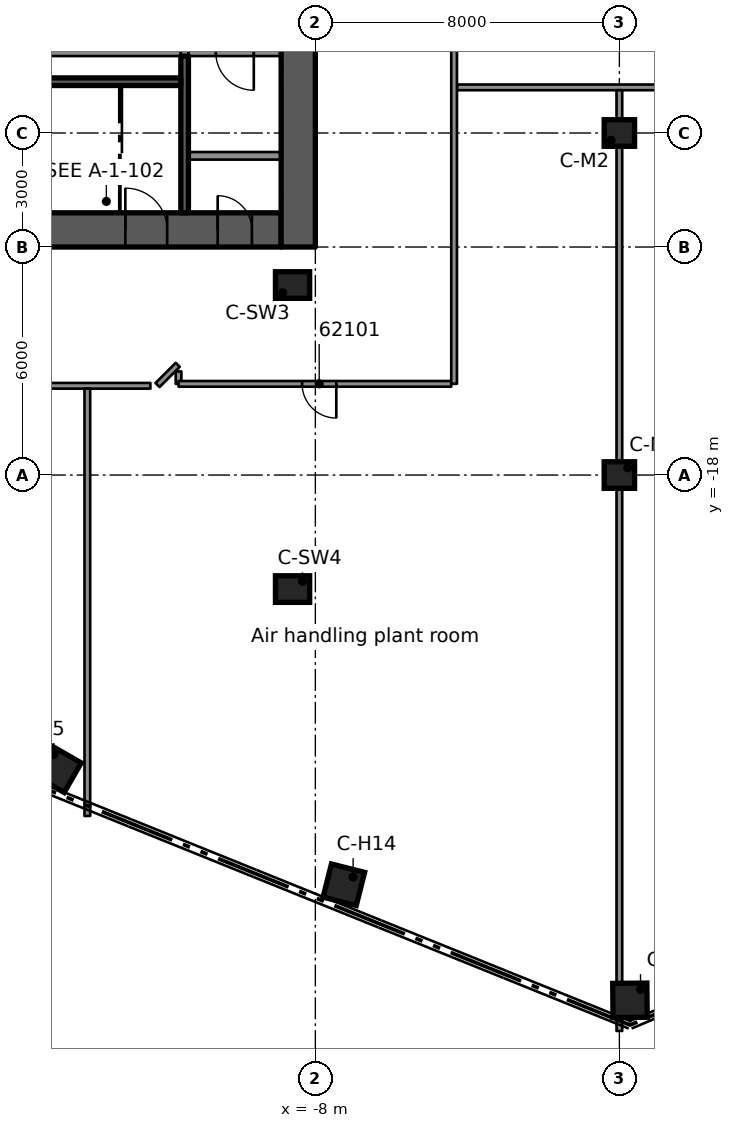
"""IFC4 building model, lengths in metres.
Left out: names, types, materials, properties, quantities, classifications, styles, units other than length and angle.
Written with IfcOpenShell. Run it as: python <this file> out.ifc"""

import sys

from ifc_helpers import new_model, si_unit, direction, frame, frame_2d, origin, origin_2d, place, context, subcontext, project, spatial, rectangle, extrude, element, fill, save


model = new_model("IFC4")
c1 = context("Model", 3, precision=1e-05, world=origin(), true_north=direction((0.0, 1.0)))
c2 = subcontext(c1, "Body", "Model", "MODEL_VIEW")
j1 = project(units=[si_unit("LENGTHUNIT", "METRE"), si_unit("PLANEANGLEUNIT", "RADIAN")], contexts=[c1])
p1 = place(None, origin())
s1 = spatial("IfcSite", under=j1, at=p1, CompositionType="ELEMENT")
p2 = place(p1, origin())
s2 = spatial("IfcBuilding", under=s1, at=p2, CompositionType="ELEMENT")
p3 = place(p2, frame((0.0, 0.0, 299.9)))
s3 = spatial("IfcBuildingStorey", under=s2, at=p3, CompositionType="ELEMENT", Elevation=299.9)
p4 = place(p3, frame((-18.1, -11.55, 0.0), z_axis=(0.0, 0.0, 1.0), x_axis=(1.0, 0.0, 0.0)))
e1 = element("IfcWall", 1, at=p4, inside=s3, PredefinedType="SHEAR", context=c2, shape_type="SweptSolid", body=[
    extrude(rectangle(XDim=9.2, YDim=0.9, at=frame_2d((4.6, 0.0))), origin(), (0.0, 0.0, 1.0), 4.4),
])
p5 = place(p4, frame((5.1, 0.0, 0.0)))
e2 = element("IfcOpeningElement", 2, at=p5, cuts=e1, PredefinedType="OPENING", context=c2, shape_type="SweptSolid", body=[
    extrude(rectangle(XDim=1.1, YDim=2.1, at=frame_2d((0.55, 1.05))), frame((0.0, 0.46, 0.0), z_axis=(0.0, -1.0, 0.0), x_axis=(1.0, 0.0, 0.0)), (0.0, 0.0, 1.0), 0.92),
])
p6 = place(p4, frame((7.53, 0.0, 0.0)))
e3 = element("IfcOpeningElement", 3, at=p6, cuts=e1, PredefinedType="OPENING", context=c2, shape_type="SweptSolid", body=[
    extrude(rectangle(XDim=0.9, YDim=2.1, at=frame_2d((0.45, 1.05))), frame((0.0, 0.46, 0.0), z_axis=(0.0, -1.0, 0.0), x_axis=(1.0, 0.0, 0.0)), (0.0, 0.0, 1.0), 0.92),
])
p7 = place(p3, frame((-8.45, -12.0, 0.0), z_axis=(0.0, 0.0, 1.0), x_axis=(0.0, 1.0, 0.0)))
e4 = element("IfcWall", 4, at=p7, inside=s3, PredefinedType="SHEAR", context=c2, shape_type="SweptSolid", body=[
    extrude(rectangle(XDim=24.0, YDim=0.9, at=frame_2d((12.0, 0.0))), origin(), (0.0, 0.0, 1.0), 4.4),
])
p8 = place(p7, frame((9.6, 0.0, 0.0)))
e5 = element("IfcOpeningElement", 5, at=p8, cuts=e4, PredefinedType="OPENING", context=c2, shape_type="SweptSolid", body=[
    extrude(rectangle(XDim=1.8, YDim=2.1, at=frame_2d((0.9, 1.05))), frame((0.0, 0.46, 0.0), z_axis=(0.0, -1.0, 0.0), x_axis=(1.0, 0.0, 0.0)), (0.0, 0.0, 1.0), 0.92),
])
p9 = place(p7, frame((5.9, 0.0, 0.0)))
e6 = element("IfcOpeningElement", 6, at=p9, cuts=e4, PredefinedType="OPENING", context=c2, shape_type="SweptSolid", body=[
    extrude(rectangle(XDim=1.8, YDim=2.1, at=frame_2d((0.9, 1.05))), frame((0.0, 0.46, 0.0), z_axis=(0.0, -1.0, 0.0), x_axis=(1.0, 0.0, 0.0)), (0.0, 0.0, 1.0), 0.92),
])
p10 = place(p7, frame((12.6, 0.0, 0.0)))
e7 = element("IfcOpeningElement", 7, at=p10, cuts=e4, PredefinedType="OPENING", context=c2, shape_type="SweptSolid", body=[
    extrude(rectangle(XDim=1.8, YDim=2.1, at=frame_2d((0.9, 1.05))), frame((0.0, 0.46, 0.0), z_axis=(0.0, -1.0, 0.0), x_axis=(1.0, 0.0, 0.0)), (0.0, 0.0, 1.0), 0.92),
])
p11 = place(p7, frame((19.65, 0.0, 0.0)))
e8 = element("IfcOpeningElement", 8, at=p11, cuts=e4, PredefinedType="OPENING", context=c2, shape_type="SweptSolid", body=[
    extrude(rectangle(XDim=1.1, YDim=2.1, at=frame_2d((0.55, 1.05))), frame((0.0, 0.46, 0.0), z_axis=(0.0, -1.0, 0.0), x_axis=(1.0, 0.0, 0.0)), (0.0, 0.0, 1.0), 0.92),
])
for number, where, z_axis, x_axis in (
    (9, (0.278, -31.821, 0.0), (0.0, 0.0, 1.0), (0.009, -1.0, 0.0)),
    (10, (-7.25, -28.78, 0.0), (0.0, 0.0, 1.0), (-0.244, -0.97, 0.0)),
    (11, (-14.777, -25.739, 0.0), (0.0, 0.0, 1.0), (-0.498, -0.867, 0.0)),
):
    element("IfcColumn", number, at=place(p3, frame(where, z_axis=z_axis, x_axis=x_axis)), inside=s3, PredefinedType="COLUMN", context=c2, shape_type="SweptSolid", body=[
        extrude(rectangle(XDim=0.9, YDim=0.9, at=origin_2d()), origin(), (0.0, 0.0, 1.0), 4.4),
    ])
for number, where, z_axis, x_axis in (
    (12, (0.0, -18.0, 0.0), (0.0, 0.0, 1.0), (1.0, 0.0, 0.0)),
    (13, (0.0, -9.0, 0.0), (0.0, 0.0, 1.0), (1.0, 0.0, 0.0)),
):
    element("IfcColumn", number, at=place(p3, frame(where, z_axis=z_axis, x_axis=x_axis)), inside=s3, PredefinedType="COLUMN", context=c2, shape_type="SweptSolid", body=[
        extrude(rectangle(XDim=0.8, YDim=0.7, at=origin_2d()), origin(), (0.0, 0.0, 1.0), 4.4),
    ])
for number, where, z_axis, x_axis in (
    (14, (-8.6, -13.0, 0.0), (0.0, 0.0, 1.0), (1.0, 0.0, 0.0)),
    (15, (-8.6, -21.0, 0.0), (0.0, 0.0, 1.0), (1.0, 0.0, 0.0)),
):
    element("IfcColumn", number, at=place(p3, frame(where, z_axis=z_axis, x_axis=x_axis)), inside=s3, PredefinedType="COLUMN", context=c2, shape_type="SweptSolid", body=[
        extrude(rectangle(XDim=0.9, YDim=0.7, at=origin_2d()), origin(), (0.0, 0.0, 1.0), 4.4),
    ])
p12 = place(p3, frame((-11.54, -6.875, 0.0), z_axis=(0.0, 0.0, 1.0), x_axis=(-1.0, 0.0, 0.0)))
e16 = element("IfcWall", 16, at=p12, inside=s3, PredefinedType="SOLIDWALL", context=c2, shape_type="SweptSolid", body=[
    extrude(rectangle(XDim=6.56, YDim=0.2, at=frame_2d((3.28, 0.0))), origin(), (0.0, 0.0, 1.0), 3.98),
])
p13 = place(p3, frame((-11.44, -6.975, 0.0), z_axis=(0.0, 0.0, 1.0), x_axis=(0.0, 1.0, 0.0)))
e17 = element("IfcWall", 17, at=p13, inside=s3, PredefinedType="SOLIDWALL", context=c2, shape_type="SweptSolid", body=[
    extrude(rectangle(XDim=13.95, YDim=0.2, at=frame_2d((6.975, 0.0))), origin(), (0.0, 0.0, 1.0), 3.98),
])
p14 = place(p13, frame((11.925, 0.0, 0.0)))
e18 = element("IfcOpeningElement", 18, at=p14, cuts=e17, PredefinedType="OPENING", context=c2, shape_type="SweptSolid", body=[
    extrude(rectangle(XDim=1.1, YDim=2.1, at=frame_2d((0.55, 1.05))), frame((0.0, 0.11, 0.0), z_axis=(0.0, -1.0, 0.0), x_axis=(1.0, 0.0, 0.0)), (0.0, 0.0, 1.0), 0.22),
])
p15 = place(p13, frame((1.075, 0.0, 0.0)))
e19 = element("IfcOpeningElement", 19, at=p15, cuts=e17, PredefinedType="OPENING", context=c2, shape_type="SweptSolid", body=[
    extrude(rectangle(XDim=0.8, YDim=2.1, at=frame_2d((0.4, 1.05))), frame((0.0, 0.11, 0.0), z_axis=(0.0, -1.0, 0.0), x_axis=(1.0, 0.0, 0.0)), (0.0, 0.0, 1.0), 0.22),
])
p16 = place(p13, frame((9.325, 0.0, 0.0)))
e20 = element("IfcOpeningElement", 20, at=p16, cuts=e17, PredefinedType="OPENING", context=c2, shape_type="SweptSolid", body=[
    extrude(rectangle(XDim=0.8, YDim=2.1, at=frame_2d((0.4, 1.05))), frame((0.0, 0.11, 0.0), z_axis=(0.0, -1.0, 0.0), x_axis=(1.0, 0.0, 0.0)), (0.0, 0.0, 1.0), 0.22),
])
p17 = place(p3, frame((-11.44, -11.1, 0.0), z_axis=(0.0, 0.0, 1.0), x_axis=(0.0, 1.0, 0.0)))
e21 = element("IfcWall", 21, at=p17, inside=s3, PredefinedType="SOLIDWALL", context=c2, shape_type="SweptSolid", body=[
    extrude(rectangle(XDim=4.125, YDim=0.2, at=frame_2d((2.062, 0.0))), origin(), (0.0, 0.0, 1.0), 3.98),
])
p18 = place(p3, frame((-11.54, -7.65, 0.0), z_axis=(0.0, 0.0, 1.0), x_axis=(-1.0, 0.0, 0.0)))
e22 = element("IfcWall", 22, at=p18, inside=s3, PredefinedType="SOLIDWALL", context=c2, shape_type="SweptSolid", body=[
    extrude(rectangle(XDim=6.56, YDim=0.2, at=frame_2d((3.28, 0.0))), origin(), (0.0, 0.0, 1.0), 3.98),
])
p19 = place(p3, frame((-8.9, -6.875, 0.0), z_axis=(0.0, 0.0, 1.0), x_axis=(-1.0, 0.0, 0.0)))
e23 = element("IfcWall", 23, at=p19, inside=s3, PredefinedType="PARTITIONING", context=c2, shape_type="SweptSolid", body=[
    extrude(rectangle(XDim=2.44, YDim=0.2, at=frame_2d((1.22, 0.0))), origin(), (0.0, 0.0, 1.0), 3.98),
])
p20 = place(p19, frame((0.72, 0.0, 0.0)))
e24 = element("IfcOpeningElement", 24, at=p20, cuts=e23, PredefinedType="OPENING", context=c2, shape_type="SweptSolid", body=[
    extrude(rectangle(XDim=1.0, YDim=2.1, at=frame_2d((0.5, 1.05))), frame((0.0, 0.11, 0.0), z_axis=(0.0, -1.0, 0.0), x_axis=(1.0, 0.0, 0.0)), (0.0, 0.0, 1.0), 0.22),
])
p21 = place(p3, frame((-8.9, -9.6, 0.0), z_axis=(0.0, 0.0, 1.0), x_axis=(-1.0, 0.0, 0.0)))
e25 = element("IfcWall", 25, at=p21, inside=s3, PredefinedType="PARTITIONING", context=c2, shape_type="SweptSolid", body=[
    extrude(rectangle(XDim=2.44, YDim=0.2, at=frame_2d((1.22, 0.0))), origin(), (0.0, 0.0, 1.0), 3.98),
])
p22 = place(p3, frame((-11.601, -15.273, 0.0), z_axis=(0.0, 0.0, 1.0), x_axis=(0.002985061327, -0.999995544695, 0.0)))
e26 = element("IfcWall", 26, at=p22, inside=s3, PredefinedType="PARTITIONING", context=c2, shape_type="SweptSolid", body=[
    extrude(rectangle(XDim=0.327, YDim=0.15, at=frame_2d((0.164, 0.0))), origin(), (0.0, 0.0, 1.0), 3.98),
])
p23 = place(p3, frame((-22.575, -15.651, 0.0), z_axis=(0.0, 0.0, 1.0), x_axis=(1.0, 0.0, 0.0)))
e27 = element("IfcWall", 27, at=p23, inside=s3, PredefinedType="PARTITIONING", context=c2, shape_type="SweptSolid", body=[
    extrude(rectangle(XDim=10.234, YDim=0.15, at=frame_2d((5.117, 0.0))), origin(), (0.0, 0.0, 1.0), 3.98),
])
p24 = place(p3, frame((-4.424, -15.6, 0.0), z_axis=(0.0, 0.0, 1.0), x_axis=(-1.0, 0.0, 0.0)))
e28 = element("IfcWall", 28, at=p24, inside=s3, PredefinedType="PARTITIONING", context=c2, shape_type="SweptSolid", body=[
    extrude(rectangle(XDim=7.176, YDim=0.15, at=frame_2d((3.588, 0.0))), origin(), (0.0, 0.0, 1.0), 3.98),
])
p25 = place(p24, frame((3.025, 0.0, 0.0)))
e29 = element("IfcOpeningElement", 29, at=p25, cuts=e28, PredefinedType="OPENING", context=c2, shape_type="SweptSolid", body=[
    extrude(rectangle(XDim=0.9, YDim=2.1, at=frame_2d((0.45, 1.05))), frame((0.0, 0.085, 0.0), z_axis=(0.0, -1.0, 0.0), x_axis=(1.0, 0.0, 0.0)), (0.0, 0.0, 1.0), 0.17),
])
p26 = place(p3, frame((-4.274, -7.799, 0.0), z_axis=(0.0, 0.0, 1.0), x_axis=(1.0, 0.0, 0.0)))
e30 = element("IfcWall", 30, at=p26, inside=s3, PredefinedType="PARTITIONING", context=c2, shape_type="SweptSolid", body=[
    extrude(rectangle(XDim=8.549, YDim=0.15, at=frame_2d((4.274, 0.0))), origin(), (0.0, 0.0, 1.0), 3.98),
])
p27 = place(p3, frame((-12.153, -15.631, 0.0), z_axis=(0.0, 0.0, 1.0), x_axis=(0.707106781187, 0.707106781187, 0.0)))
e31 = element("IfcWall", 31, at=p27, inside=s3, PredefinedType="PARTITIONING", context=c2, shape_type="SweptSolid", body=[
    extrude(rectangle(XDim=0.751, YDim=0.15, at=frame_2d((0.375, 0.0))), origin(), (0.0, 0.0, 1.0), 3.98),
])
p28 = place(p3, frame((0.0, -32.627, 0.0), z_axis=(0.0, 0.0, 1.0), x_axis=(0.0, 1.0, 0.0)))
e32 = element("IfcWall", 32, at=p28, inside=s3, PredefinedType="PARTITIONING", context=c2, shape_type="SweptSolid", body=[
    extrude(rectangle(XDim=24.753, YDim=0.15, at=frame_2d((12.376, 0.0))), origin(), (0.0, 0.0, 1.0), 3.98),
])
p29 = place(p3, frame((-4.349, 15.6, 0.0), z_axis=(0.0, 0.0, 1.0), x_axis=(0.0, -1.0, 0.0)))
e33 = element("IfcWall", 33, at=p29, inside=s3, PredefinedType="PARTITIONING", context=c2, shape_type="SweptSolid", body=[
    extrude(rectangle(XDim=31.2, YDim=0.15, at=frame_2d((15.6, 0.0))), origin(), (0.0, 0.0, 1.0), 3.98),
])
p30 = place(p29, frame((18.95, 0.0, 0.0)))
e34 = element("IfcOpeningElement", 34, at=p30, cuts=e33, PredefinedType="OPENING", context=c2, shape_type="SweptSolid", body=[
    extrude(rectangle(XDim=0.9, YDim=2.1, at=frame_2d((0.45, 1.05))), frame((0.0, 0.085, 0.0), z_axis=(0.0, -1.0, 0.0), x_axis=(1.0, 0.0, 0.0)), (0.0, 0.0, 1.0), 0.17),
])
p31 = place(p29, frame((11.151, 0.0, 0.0)))
e35 = element("IfcOpeningElement", 35, at=p31, cuts=e33, PredefinedType="OPENING", context=c2, shape_type="SweptSolid", body=[
    extrude(rectangle(XDim=0.9, YDim=2.1, at=frame_2d((0.45, 1.05))), frame((0.0, 0.085, 0.0), z_axis=(0.0, -1.0, 0.0), x_axis=(1.0, 0.0, 0.0)), (0.0, 0.0, 1.0), 0.17),
])
p32 = place(p29, frame((3.35, 0.0, 0.0)))
e36 = element("IfcOpeningElement", 36, at=p32, cuts=e33, PredefinedType="OPENING", context=c2, shape_type="SweptSolid", body=[
    extrude(rectangle(XDim=0.9, YDim=2.1, at=frame_2d((0.45, 1.05))), frame((0.0, 0.085, 0.0), z_axis=(0.0, -1.0, 0.0), x_axis=(1.0, 0.0, 0.0)), (0.0, 0.0, 1.0), 0.17),
])
p33 = place(p3, frame((-14.0, -26.97, 0.0), z_axis=(0.0, 0.0, 1.0), x_axis=(0.0, 1.0, 0.0)))
e37 = element("IfcWall", 37, at=p33, inside=s3, PredefinedType="PARTITIONING", context=c2, shape_type="SweptSolid", body=[
    extrude(rectangle(XDim=11.244, YDim=0.15, at=frame_2d((5.622, 0.0))), origin(), (0.0, 0.0, 1.0), 3.98),
])
p34 = place(p5, origin())
e38 = element("IfcDoor", 38, at=p34, inside=s3, OperationType="SINGLE_SWING_RIGHT", PredefinedType="DOOR", context=c2, shape_type="SweptSolid", body=[
    extrude(rectangle(XDim=1.1, YDim=2.1, at=frame_2d((0.55, 1.05))), frame((0.0, 0.025, 0.0), z_axis=(0.0, -1.0, 0.0), x_axis=(1.0, 0.0, 0.0)), (0.0, 0.0, 1.0), 0.05),
])
fill(e2, e38)
p35 = place(p6, origin())
e39 = element("IfcDoor", 39, at=p35, inside=s3, OperationType="SINGLE_SWING_RIGHT", PredefinedType="DOOR", context=c2, shape_type="SweptSolid", body=[
    extrude(rectangle(XDim=0.9, YDim=2.1, at=frame_2d((0.45, 1.05))), frame((0.0, 0.025, 0.0), z_axis=(0.0, -1.0, 0.0), x_axis=(1.0, 0.0, 0.0)), (0.0, 0.0, 1.0), 0.05),
])
fill(e3, e39)
p36 = place(p20, origin())
e40 = element("IfcDoor", 40, at=p36, inside=s3, OperationType="SINGLE_SWING_RIGHT", PredefinedType="DOOR", context=c2, shape_type="SweptSolid", body=[
    extrude(rectangle(XDim=1.0, YDim=2.1, at=frame_2d((0.5, 1.05))), frame((0.0, 0.025, 0.0), z_axis=(0.0, -1.0, 0.0), x_axis=(1.0, 0.0, 0.0)), (0.0, 0.0, 1.0), 0.05),
])
fill(e24, e40)
p37 = place(p25, origin())
e41 = element("IfcDoor", 41, at=p37, inside=s3, OperationType="SINGLE_SWING_LEFT", PredefinedType="DOOR", context=c2, shape_type="SweptSolid", body=[
    extrude(rectangle(XDim=0.9, YDim=2.1, at=frame_2d((0.45, 1.05))), frame((0.0, 0.025, 0.0), z_axis=(0.0, -1.0, 0.0), x_axis=(1.0, 0.0, 0.0)), (0.0, 0.0, 1.0), 0.05),
])
fill(e29, e41)
save(model, sys.argv[1])
